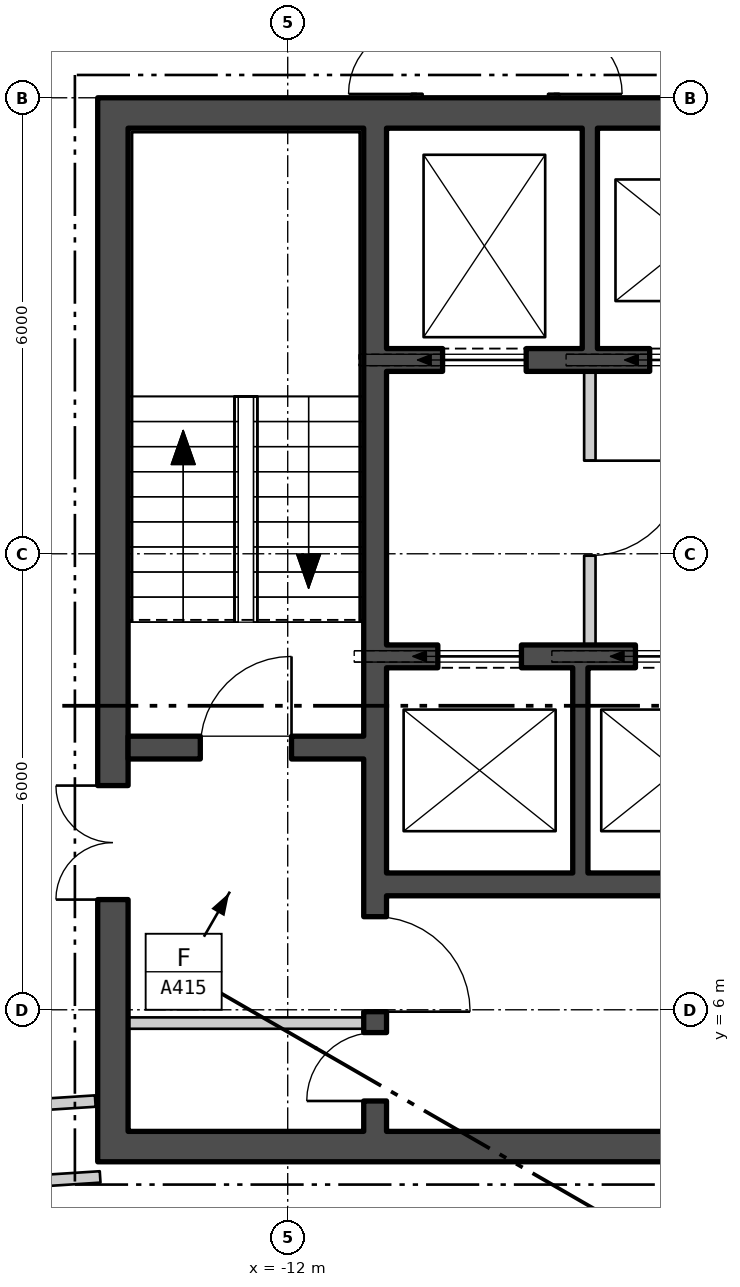
"""IFC4 building model, lengths in metres.
Left out: names, types, materials, properties, quantities, classifications, styles, units other than length and angle.
Written with IfcOpenShell. Run it as: python <this file> out.ifc"""

import sys

from ifc_helpers import new_model, si_unit, direction, frame, frame_2d, origin, place, context, subcontext, project, spatial, polyline, rectangle, outline, extrude, element, fill, save


model = new_model("IFC4")
c1 = context("Model", 3, precision=1e-05, world=origin(), true_north=direction((0.0, 1.0)))
c2 = subcontext(c1, "Body", "Model", "MODEL_VIEW")
j1 = project(units=[si_unit("LENGTHUNIT", "METRE"), si_unit("PLANEANGLEUNIT", "RADIAN")], contexts=[c1])
p1 = place(None, origin())
s1 = spatial("IfcSite", under=j1, at=p1, CompositionType="ELEMENT")
p2 = place(p1, origin())
s2 = spatial("IfcBuilding", under=s1, at=p2, CompositionType="ELEMENT")
p3 = place(p2, frame((0.0, 0.0, 292.2)))
s3 = spatial("IfcBuildingStorey", under=s2, at=p3, CompositionType="ELEMENT", Elevation=292.2)
p4 = place(p3, frame((-25.28, 15.792, -0.18), z_axis=(0.0, 0.0, 1.0), x_axis=(0.500000141277, -0.866025322218, 0.0)))
e1 = element("IfcWall", 1, at=p4, inside=s3, PredefinedType="SOLIDWALL", context=c2, shape_type="SweptSolid", body=[
    extrude(outline(polyline([(-0.13, -0.225), (45.86, -0.225), (45.6, 0.225), (0.13, 0.225), (-0.13, -0.225)])), origin(), (0.0, 0.0, 1.0), 5.9),
])
p5 = place(p4, frame((1.424, 0.0, 1.38)))
e2 = element("IfcOpeningElement", 2, at=p5, cuts=e1, PredefinedType="OPENING", context=c2, shape_type="SweptSolid", body=[
    extrude(rectangle(XDim=2.4, YDim=3.6, at=frame_2d((1.2, 1.8))), frame((0.0, 0.235, 0.0), z_axis=(0.0, -1.0, 0.0), x_axis=(1.0, 0.0, 0.0)), (0.0, 0.0, 1.0), 0.47),
])
p6 = place(p4, frame((5.892, 0.0, 1.38)))
e3 = element("IfcOpeningElement", 3, at=p6, cuts=e1, PredefinedType="OPENING", context=c2, shape_type="SweptSolid", body=[
    extrude(rectangle(XDim=2.4, YDim=3.6, at=frame_2d((1.2, 1.8))), frame((0.0, 0.235, 0.0), z_axis=(0.0, -1.0, 0.0), x_axis=(1.0, 0.0, 0.0)), (0.0, 0.0, 1.0), 0.47),
])
p7 = place(p4, frame((10.399, 0.0, 1.38)))
e4 = element("IfcOpeningElement", 4, at=p7, cuts=e1, PredefinedType="OPENING", context=c2, shape_type="SweptSolid", body=[
    extrude(rectangle(XDim=2.4, YDim=3.6, at=frame_2d((1.2, 1.8))), frame((0.0, 0.235, 0.0), z_axis=(0.0, -1.0, 0.0), x_axis=(1.0, 0.0, 0.0)), (0.0, 0.0, 1.0), 0.47),
])
p8 = place(p4, frame((14.905, 0.0, 1.38)))
e5 = element("IfcOpeningElement", 5, at=p8, cuts=e1, PredefinedType="OPENING", context=c2, shape_type="SweptSolid", body=[
    extrude(rectangle(XDim=2.4, YDim=3.6, at=frame_2d((1.2, 1.8))), frame((0.0, 0.235, 0.0), z_axis=(0.0, -1.0, 0.0), x_axis=(1.0, 0.0, 0.0)), (0.0, 0.0, 1.0), 0.47),
])
p9 = place(p4, frame((19.412, 0.0, 1.38)))
e6 = element("IfcOpeningElement", 6, at=p9, cuts=e1, PredefinedType="OPENING", context=c2, shape_type="SweptSolid", body=[
    extrude(rectangle(XDim=2.4, YDim=3.6, at=frame_2d((1.2, 1.8))), frame((0.0, 0.235, 0.0), z_axis=(0.0, -1.0, 0.0), x_axis=(1.0, 0.0, 0.0)), (0.0, 0.0, 1.0), 0.47),
])
p10 = place(p4, frame((23.918, 0.0, 1.38)))
e7 = element("IfcOpeningElement", 7, at=p10, cuts=e1, PredefinedType="OPENING", context=c2, shape_type="SweptSolid", body=[
    extrude(rectangle(XDim=2.4, YDim=3.6, at=frame_2d((1.2, 1.8))), frame((0.0, 0.235, 0.0), z_axis=(0.0, -1.0, 0.0), x_axis=(1.0, 0.0, 0.0)), (0.0, 0.0, 1.0), 0.47),
])
p11 = place(p4, frame((28.425, 0.0, 1.38)))
e8 = element("IfcOpeningElement", 8, at=p11, cuts=e1, PredefinedType="OPENING", context=c2, shape_type="SweptSolid", body=[
    extrude(rectangle(XDim=2.4, YDim=3.6, at=frame_2d((1.2, 1.8))), frame((0.0, 0.235, 0.0), z_axis=(0.0, -1.0, 0.0), x_axis=(1.0, 0.0, 0.0)), (0.0, 0.0, 1.0), 0.47),
])
p12 = place(p4, frame((32.932, 0.0, 1.38)))
e9 = element("IfcOpeningElement", 9, at=p12, cuts=e1, PredefinedType="OPENING", context=c2, shape_type="SweptSolid", body=[
    extrude(rectangle(XDim=2.4, YDim=3.6, at=frame_2d((1.2, 1.8))), frame((0.0, 0.235, 0.0), z_axis=(0.0, -1.0, 0.0), x_axis=(1.0, 0.0, 0.0)), (0.0, 0.0, 1.0), 0.47),
])
p13 = place(p4, frame((37.438, 0.0, 1.38)))
e10 = element("IfcOpeningElement", 10, at=p13, cuts=e1, PredefinedType="OPENING", context=c2, shape_type="SweptSolid", body=[
    extrude(rectangle(XDim=2.4, YDim=3.6, at=frame_2d((1.2, 1.8))), frame((0.0, 0.235, 0.0), z_axis=(0.0, -1.0, 0.0), x_axis=(1.0, 0.0, 0.0)), (0.0, 0.0, 1.0), 0.47),
])
p14 = place(p4, frame((41.907, 0.0, 1.38)))
e11 = element("IfcOpeningElement", 11, at=p14, cuts=e1, PredefinedType="OPENING", context=c2, shape_type="SweptSolid", body=[
    extrude(rectangle(XDim=2.4, YDim=3.6, at=frame_2d((1.2, 1.8))), frame((0.0, 0.235, 0.0), z_axis=(0.0, -1.0, 0.0), x_axis=(1.0, 0.0, 0.0)), (0.0, 0.0, 1.0), 0.47),
])
p15 = place(p3, frame((-14.5, 4.2, 0.0), z_axis=(0.0, 0.0, 1.0), x_axis=(1.0, 0.0, 0.0)))
e12 = element("IfcWall", 12, at=p15, inside=s3, PredefinedType="SHEAR", context=c2, shape_type="SweptSolid", body=[
    extrude(rectangle(XDim=29.0, YDim=0.4, at=frame_2d((14.5, 0.0))), origin(), (0.0, 0.0, 1.0), 5.7),
])
p16 = place(p15, frame((9.0, 0.0, 0.0)))
e13 = element("IfcOpeningElement", 13, at=p16, cuts=e12, PredefinedType="OPENING", context=c2, shape_type="SweptSolid", body=[
    extrude(rectangle(XDim=1.8, YDim=2.4, at=frame_2d((0.9, 1.2))), frame((0.0, 0.21, 0.0), z_axis=(0.0, -1.0, 0.0), x_axis=(1.0, 0.0, 0.0)), (0.0, 0.0, 1.0), 0.42),
])
p17 = place(p15, frame((19.0, 0.0, 0.0)))
e14 = element("IfcOpeningElement", 14, at=p17, cuts=e12, PredefinedType="OPENING", context=c2, shape_type="SweptSolid", body=[
    extrude(rectangle(XDim=1.8, YDim=2.4, at=frame_2d((0.9, 1.2))), frame((0.0, 0.21, 0.0), z_axis=(0.0, -1.0, 0.0), x_axis=(1.0, 0.0, 0.0)), (0.0, 0.0, 1.0), 0.42),
])
p18 = place(p3, frame((-14.5, 17.8, 0.0), z_axis=(0.0, 0.0, 1.0), x_axis=(1.0, 0.0, 0.0)))
e15 = element("IfcWall", 15, at=p18, inside=s3, PredefinedType="SHEAR", context=c2, shape_type="SweptSolid", body=[
    extrude(rectangle(XDim=29.0, YDim=0.4, at=frame_2d((14.5, 0.0))), origin(), (0.0, 0.0, 1.0), 5.7),
])
p19 = place(p3, frame((-14.3, 4.4, 0.0), z_axis=(0.0, 0.0, 1.0), x_axis=(0.0, 1.0, 0.0)))
e16 = element("IfcWall", 16, at=p19, inside=s3, PredefinedType="SHEAR", context=c2, shape_type="SweptSolid", body=[
    extrude(rectangle(XDim=13.2, YDim=0.4, at=frame_2d((6.6, 0.0))), origin(), (0.0, 0.0, 1.0), 5.7),
])
p20 = place(p19, frame((3.05, 0.0, 0.0)))
e17 = element("IfcOpeningElement", 17, at=p20, cuts=e16, PredefinedType="OPENING", context=c2, shape_type="SweptSolid", body=[
    extrude(rectangle(XDim=1.5, YDim=2.1, at=frame_2d((0.75, 1.05))), frame((0.0, 0.21, 0.0), z_axis=(0.0, -1.0, 0.0), x_axis=(1.0, 0.0, 0.0)), (0.0, 0.0, 1.0), 0.42),
])
p21 = place(p3, frame((-10.85, 4.4, 0.0), z_axis=(0.0, 0.0, 1.0), x_axis=(0.0, 1.0, 0.0)))
e18 = element("IfcWall", 18, at=p21, inside=s3, PredefinedType="SHEAR", context=c2, shape_type="SweptSolid", body=[
    extrude(rectangle(XDim=13.2, YDim=0.3, at=frame_2d((6.6, 0.0))), origin(), (0.0, 0.0, 1.0), 5.7),
])
p22 = place(p21, frame((1.575, 0.0, 0.0)))
e19 = element("IfcOpeningElement", 19, at=p22, cuts=e18, PredefinedType="OPENING", context=c2, shape_type="SweptSolid", body=[
    extrude(rectangle(XDim=1.25, YDim=2.1, at=frame_2d((0.625, 1.05))), frame((0.0, 0.16, 0.0), z_axis=(0.0, -1.0, 0.0), x_axis=(1.0, 0.0, 0.0)), (0.0, 0.0, 1.0), 0.32),
])
p23 = place(p21, frame((0.4, 0.0, 0.0)))
e20 = element("IfcOpeningElement", 20, at=p23, cuts=e18, PredefinedType="OPENING", context=c2, shape_type="SweptSolid", body=[
    extrude(rectangle(XDim=0.9, YDim=2.1, at=frame_2d((0.45, 1.05))), frame((0.0, 0.16, 0.0), z_axis=(0.0, -1.0, 0.0), x_axis=(1.0, 0.0, 0.0)), (0.0, 0.0, 1.0), 0.32),
])
p24 = place(p3, frame((-14.1, 9.45, 0.0), z_axis=(0.0, 0.0, 1.0), x_axis=(1.0, 0.0, 0.0)))
e21 = element("IfcWall", 21, at=p24, inside=s3, PredefinedType="SHEAR", context=c2, shape_type="SweptSolid", body=[
    extrude(rectangle(XDim=3.1, YDim=0.3, at=frame_2d((1.55, 0.0))), origin(), (0.0, 0.0, 1.0), 5.7),
])
p25 = place(p24, frame((0.95, 0.0, 0.0)))
e22 = element("IfcOpeningElement", 22, at=p25, cuts=e21, PredefinedType="OPENING", context=c2, shape_type="SweptSolid", body=[
    extrude(rectangle(XDim=1.2, YDim=2.1, at=frame_2d((0.6, 1.05))), frame((0.0, 0.16, 0.0), z_axis=(0.0, -1.0, 0.0), x_axis=(1.0, 0.0, 0.0)), (0.0, 0.0, 1.0), 0.32),
])
p26 = place(p3, frame((-10.7, 14.55, 0.0), z_axis=(0.0, 0.0, 1.0), x_axis=(1.0, 0.0, 0.0)))
e23 = element("IfcWall", 23, at=p26, inside=s3, PredefinedType="SHEAR", context=c2, shape_type="SweptSolid", body=[
    extrude(rectangle(XDim=21.4, YDim=0.3, at=frame_2d((10.7, 0.0))), origin(), (0.0, 0.0, 1.0), 5.7),
])
p27 = place(p26, frame((0.738, 0.0, 0.0)))
e24 = element("IfcOpeningElement", 24, at=p27, cuts=e23, PredefinedType="OPENING", context=c2, shape_type="SweptSolid", body=[
    extrude(rectangle(XDim=1.1, YDim=2.1, at=frame_2d((0.55, 1.05))), frame((0.0, 0.16, 0.0), z_axis=(0.0, -1.0, 0.0), x_axis=(1.0, 0.0, 0.0)), (0.0, 0.0, 1.0), 0.32),
])
p28 = place(p26, frame((3.462, 0.0, 0.0)))
e25 = element("IfcOpeningElement", 25, at=p28, cuts=e23, PredefinedType="OPENING", context=c2, shape_type="SweptSolid", body=[
    extrude(rectangle(XDim=1.1, YDim=2.1, at=frame_2d((0.55, 1.05))), frame((0.0, 0.16, 0.0), z_axis=(0.0, -1.0, 0.0), x_axis=(1.0, 0.0, 0.0)), (0.0, 0.0, 1.0), 0.32),
])
p29 = place(p26, frame((6.138, 0.0, 0.0)))
e26 = element("IfcOpeningElement", 26, at=p29, cuts=e23, PredefinedType="OPENING", context=c2, shape_type="SweptSolid", body=[
    extrude(rectangle(XDim=1.1, YDim=2.1, at=frame_2d((0.55, 1.05))), frame((0.0, 0.16, 0.0), z_axis=(0.0, -1.0, 0.0), x_axis=(1.0, 0.0, 0.0)), (0.0, 0.0, 1.0), 0.32),
])
p30 = place(p26, frame((8.812, 0.0, 0.0)))
e27 = element("IfcOpeningElement", 27, at=p30, cuts=e23, PredefinedType="OPENING", context=c2, shape_type="SweptSolid", body=[
    extrude(rectangle(XDim=1.1, YDim=2.1, at=frame_2d((0.55, 1.05))), frame((0.0, 0.16, 0.0), z_axis=(0.0, -1.0, 0.0), x_axis=(1.0, 0.0, 0.0)), (0.0, 0.0, 1.0), 0.32),
])
p31 = place(p26, frame((19.562, 0.0, 0.0)))
e28 = element("IfcOpeningElement", 28, at=p31, cuts=e23, PredefinedType="OPENING", context=c2, shape_type="SweptSolid", body=[
    extrude(rectangle(XDim=1.1, YDim=2.1, at=frame_2d((0.55, 1.05))), frame((0.0, 0.16, 0.0), z_axis=(0.0, -1.0, 0.0), x_axis=(1.0, 0.0, 0.0)), (0.0, 0.0, 1.0), 0.32),
])
p32 = place(p26, frame((11.537, 0.0, 0.0)))
e29 = element("IfcOpeningElement", 29, at=p32, cuts=e23, PredefinedType="OPENING", context=c2, shape_type="SweptSolid", body=[
    extrude(rectangle(XDim=1.0, YDim=2.1, at=frame_2d((0.5, 1.05))), frame((0.0, 0.16, 0.0), z_axis=(0.0, -1.0, 0.0), x_axis=(1.0, 0.0, 0.0)), (0.0, 0.0, 1.0), 0.32),
])
p33 = place(p26, frame((15.55, 0.0, 0.0)))
e30 = element("IfcOpeningElement", 30, at=p33, cuts=e23, PredefinedType="OPENING", context=c2, shape_type="SweptSolid", body=[
    extrude(rectangle(XDim=1.0, YDim=2.1, at=frame_2d((0.5, 1.05))), frame((0.0, 0.16, 0.0), z_axis=(0.0, -1.0, 0.0), x_axis=(1.0, 0.0, 0.0)), (0.0, 0.0, 1.0), 0.32),
])
p34 = place(p3, frame((-10.7, 10.65, 0.0), z_axis=(0.0, 0.0, 1.0), x_axis=(1.0, 0.0, 0.0)))
e31 = element("IfcWall", 31, at=p34, inside=s3, PredefinedType="SHEAR", context=c2, shape_type="SweptSolid", body=[
    extrude(rectangle(XDim=10.3, YDim=0.3, at=frame_2d((5.15, 0.0))), origin(), (0.0, 0.0, 1.0), 5.7),
])
p35 = place(p34, frame((0.675, 0.0, 0.0)))
e32 = element("IfcOpeningElement", 32, at=p35, cuts=e31, PredefinedType="OPENING", context=c2, shape_type="SweptSolid", body=[
    extrude(rectangle(XDim=1.1, YDim=2.1, at=frame_2d((0.55, 1.05))), frame((0.0, 0.16, 0.0), z_axis=(0.0, -1.0, 0.0), x_axis=(1.0, 0.0, 0.0)), (0.0, 0.0, 1.0), 0.32),
])
p36 = place(p34, frame((3.275, 0.0, 0.0)))
e33 = element("IfcOpeningElement", 33, at=p36, cuts=e31, PredefinedType="OPENING", context=c2, shape_type="SweptSolid", body=[
    extrude(rectangle(XDim=1.1, YDim=2.1, at=frame_2d((0.55, 1.05))), frame((0.0, 0.16, 0.0), z_axis=(0.0, -1.0, 0.0), x_axis=(1.0, 0.0, 0.0)), (0.0, 0.0, 1.0), 0.32),
])
p37 = place(p34, frame((5.825, 0.0, 0.0)))
e34 = element("IfcOpeningElement", 34, at=p37, cuts=e31, PredefinedType="OPENING", context=c2, shape_type="SweptSolid", body=[
    extrude(rectangle(XDim=1.1, YDim=2.1, at=frame_2d((0.55, 1.05))), frame((0.0, 0.16, 0.0), z_axis=(0.0, -1.0, 0.0), x_axis=(1.0, 0.0, 0.0)), (0.0, 0.0, 1.0), 0.32),
])
p38 = place(p34, frame((8.425, 0.0, 0.0)))
e35 = element("IfcOpeningElement", 35, at=p38, cuts=e31, PredefinedType="OPENING", context=c2, shape_type="SweptSolid", body=[
    extrude(rectangle(XDim=1.0, YDim=2.1, at=frame_2d((0.5, 1.05))), frame((0.0, 0.16, 0.0), z_axis=(0.0, -1.0, 0.0), x_axis=(1.0, 0.0, 0.0)), (0.0, 0.0, 1.0), 0.32),
])
p39 = place(p3, frame((-10.7, 7.65, 0.0), z_axis=(0.0, 0.0, 1.0), x_axis=(1.0, 0.0, 0.0)))
e36 = element("IfcWall", 36, at=p39, inside=s3, PredefinedType="SHEAR", context=c2, shape_type="SweptSolid", body=[
    extrude(rectangle(XDim=10.3, YDim=0.3, at=frame_2d((5.15, 0.0))), origin(), (0.0, 0.0, 1.0), 5.7),
])
p40 = place(p3, frame((-8.025, 14.7, 0.0), z_axis=(0.0, 0.0, 1.0), x_axis=(0.0, 1.0, 0.0)))
e37 = element("IfcWall", 37, at=p40, inside=s3, PredefinedType="SHEAR", context=c2, shape_type="SweptSolid", body=[
    extrude(rectangle(XDim=2.9, YDim=0.2, at=frame_2d((1.45, 0.0))), origin(), (0.0, 0.0, 1.0), 5.7),
])
p41 = place(p3, frame((-8.15, 7.8, 0.0), z_axis=(0.0, 0.0, 1.0), x_axis=(0.0, 1.0, 0.0)))
e38 = element("IfcWall", 38, at=p41, inside=s3, PredefinedType="SHEAR", context=c2, shape_type="SweptSolid", body=[
    extrude(rectangle(XDim=2.7, YDim=0.2, at=frame_2d((1.35, 0.0))), origin(), (0.0, 0.0, 1.0), 5.7),
])
p42 = place(p3, frame((-8.025, 10.8, 0.0), z_axis=(0.0, 0.0, 1.0), x_axis=(0.0, 1.0, 0.0)))
e39 = element("IfcWall", 39, at=p42, inside=s3, PredefinedType="PARTITIONING", context=c2, shape_type="SweptSolid", body=[
    extrude(rectangle(XDim=3.6, YDim=0.15, at=frame_2d((1.8, 0.0))), origin(), (0.0, 0.0, 1.0), 5.7),
])
p43 = place(p42, frame((1.175, 0.0, 0.0)))
e40 = element("IfcOpeningElement", 40, at=p43, cuts=e39, PredefinedType="OPENING", context=c2, shape_type="SweptSolid", body=[
    extrude(rectangle(XDim=1.25, YDim=2.1, at=frame_2d((0.625, 1.05))), frame((0.0, 0.085, 0.0), z_axis=(0.0, -1.0, 0.0), x_axis=(1.0, 0.0, 0.0)), (0.0, 0.0, 1.0), 0.17),
])
p44 = place(p3, frame((-14.1, 5.825, 0.0), z_axis=(0.0, 0.0, 1.0), x_axis=(1.0, 0.0, 0.0)))
e41 = element("IfcWall", 41, at=p44, inside=s3, PredefinedType="PARTITIONING", context=c2, shape_type="SweptSolid", body=[
    extrude(rectangle(XDim=3.1, YDim=0.15, at=frame_2d((1.55, 0.0))), origin(), (0.0, 0.0, 1.0), 5.7),
])
p45 = place(p3, frame((-16.504, 4.672, 0.0), z_axis=(0.0, 0.0, 1.0), x_axis=(0.997932644153, 0.064268481647, 0.0)))
e42 = element("IfcWall", 42, at=p45, inside=s3, PredefinedType="PARTITIONING", context=c2, shape_type="SweptSolid", body=[
    extrude(rectangle(XDim=1.976, YDim=0.15, at=frame_2d((0.988, 0.0))), origin(), (0.0, 0.0, 1.0), 5.7),
])
p46 = place(p3, frame((-16.2, 3.689, 0.0), z_axis=(0.0, 0.0, 1.0), x_axis=(0.997915745008, 0.064530348407, 0.0)))
e43 = element("IfcWall", 43, at=p46, inside=s3, PredefinedType="PARTITIONING", context=c2, shape_type="SweptSolid", body=[
    extrude(rectangle(XDim=1.736, YDim=0.15, at=frame_2d((0.868, 0.0))), origin(), (0.0, 0.0, 1.0), 5.7),
])
p47 = place(p3, frame((-10.3, 18.0, 0.0), z_axis=(0.0, 0.0, 1.0), x_axis=(0.0, 1.0, 0.0)))
e44 = element("IfcWall", 44, at=p47, inside=s3, PredefinedType="PARTITIONING", context=c2, shape_type="SweptSolid", body=[
    extrude(rectangle(XDim=1.75, YDim=0.15, at=frame_2d((0.875, 0.0))), origin(), (0.0, 0.0, 1.0), 5.7),
])
p48 = place(p47, frame((0.05, 0.0, 0.0)))
e45 = element("IfcOpeningElement", 45, at=p48, cuts=e44, PredefinedType="OPENING", context=c2, shape_type="SweptSolid", body=[
    extrude(rectangle(XDim=0.9, YDim=2.1, at=frame_2d((0.45, 1.05))), frame((0.0, 0.085, 0.0), z_axis=(0.0, -1.0, 0.0), x_axis=(1.0, 0.0, 0.0)), (0.0, 0.0, 1.0), 0.17),
])
p49 = place(p3, frame((-8.5, 18.0, 0.0), z_axis=(0.0, 0.0, 1.0), x_axis=(0.0, 1.0, 0.0)))
e46 = element("IfcWall", 46, at=p49, inside=s3, PredefinedType="PARTITIONING", context=c2, shape_type="SweptSolid", body=[
    extrude(rectangle(XDim=1.75, YDim=0.15, at=frame_2d((0.875, 0.0))), origin(), (0.0, 0.0, 1.0), 5.7),
])
p50 = place(p49, frame((0.05, 0.0, 0.0)))
e47 = element("IfcOpeningElement", 47, at=p50, cuts=e46, PredefinedType="OPENING", context=c2, shape_type="SweptSolid", body=[
    extrude(rectangle(XDim=0.9, YDim=2.1, at=frame_2d((0.45, 1.05))), frame((0.0, 0.085, 0.0), z_axis=(0.0, -1.0, 0.0), x_axis=(1.0, 0.0, 0.0)), (0.0, 0.0, 1.0), 0.17),
])
p51 = place(p27, origin())
e48 = element("IfcDoor", 48, at=p51, inside=s3, OperationType="SLIDING_TO_LEFT", PredefinedType="DOOR", context=c2, shape_type="SweptSolid", body=[
    extrude(rectangle(XDim=1.1, YDim=2.1, at=frame_2d((0.55, 1.05))), frame((0.0, 0.025, 0.0), z_axis=(0.0, -1.0, 0.0), x_axis=(1.0, 0.0, 0.0)), (0.0, 0.0, 1.0), 0.05),
])
fill(e24, e48)
p52 = place(p28, origin())
e49 = element("IfcDoor", 49, at=p52, inside=s3, OperationType="SLIDING_TO_LEFT", PredefinedType="DOOR", context=c2, shape_type="SweptSolid", body=[
    extrude(rectangle(XDim=1.1, YDim=2.1, at=frame_2d((0.55, 1.05))), frame((0.0, 0.025, 0.0), z_axis=(0.0, -1.0, 0.0), x_axis=(1.0, 0.0, 0.0)), (0.0, 0.0, 1.0), 0.05),
])
fill(e25, e49)
p53 = place(p35, origin())
e50 = element("IfcDoor", 50, at=p53, inside=s3, OperationType="SLIDING_TO_LEFT", PredefinedType="DOOR", context=c2, shape_type="SweptSolid", body=[
    extrude(rectangle(XDim=1.1, YDim=2.1, at=frame_2d((0.55, 1.05))), frame((0.0, 0.025, 0.0), z_axis=(0.0, -1.0, 0.0), x_axis=(1.0, 0.0, 0.0)), (0.0, 0.0, 1.0), 0.05),
])
fill(e32, e50)
p54 = place(p36, origin())
e51 = element("IfcDoor", 51, at=p54, inside=s3, OperationType="SLIDING_TO_LEFT", PredefinedType="DOOR", context=c2, shape_type="SweptSolid", body=[
    extrude(rectangle(XDim=1.1, YDim=2.1, at=frame_2d((0.55, 1.05))), frame((0.0, 0.025, 0.0), z_axis=(0.0, -1.0, 0.0), x_axis=(1.0, 0.0, 0.0)), (0.0, 0.0, 1.0), 0.05),
])
fill(e33, e51)
p55 = place(p43, origin())
e52 = element("IfcDoor", 52, at=p55, inside=s3, OperationType="SINGLE_SWING_RIGHT", PredefinedType="DOOR", context=c2, shape_type="SweptSolid", body=[
    extrude(rectangle(XDim=1.25, YDim=2.1, at=frame_2d((0.625, 1.05))), frame((0.0, 0.025, 0.0), z_axis=(0.0, -1.0, 0.0), x_axis=(1.0, 0.0, 0.0)), (0.0, 0.0, 1.0), 0.05),
])
fill(e40, e52)
p56 = place(p25, origin())
e53 = element("IfcDoor", 53, at=p56, inside=s3, OperationType="SINGLE_SWING_LEFT", PredefinedType="DOOR", context=c2, shape_type="SweptSolid", body=[
    extrude(rectangle(XDim=1.2, YDim=2.1, at=frame_2d((0.6, 1.05))), frame((0.0, 0.025, 0.0), z_axis=(0.0, -1.0, 0.0), x_axis=(1.0, 0.0, 0.0)), (0.0, 0.0, 1.0), 0.05),
])
fill(e22, e53)
p57 = place(p22, origin())
e54 = element("IfcDoor", 54, at=p57, inside=s3, OperationType="SINGLE_SWING_LEFT", PredefinedType="DOOR", context=c2, shape_type="SweptSolid", body=[
    extrude(rectangle(XDim=1.25, YDim=2.1, at=frame_2d((0.625, 1.05))), frame((0.0, 0.025, 0.0), z_axis=(0.0, -1.0, 0.0), x_axis=(1.0, 0.0, 0.0)), (0.0, 0.0, 1.0), 0.05),
])
fill(e19, e54)
p58 = place(p20, origin())
e55 = element("IfcDoor", 55, at=p58, inside=s3, OperationType="DOUBLE_DOOR_SINGLE_SWING", PredefinedType="DOOR", context=c2, shape_type="SweptSolid", body=[
    extrude(rectangle(XDim=1.5, YDim=2.1, at=frame_2d((0.75, 1.05))), frame((0.0, 0.025, 0.0), z_axis=(0.0, -1.0, 0.0), x_axis=(1.0, 0.0, 0.0)), (0.0, 0.0, 1.0), 0.05),
])
fill(e17, e55)
p59 = place(p23, origin())
e56 = element("IfcDoor", 56, at=p59, inside=s3, OperationType="SINGLE_SWING_RIGHT", PredefinedType="DOOR", context=c2, shape_type="SweptSolid", body=[
    extrude(rectangle(XDim=0.9, YDim=2.1, at=frame_2d((0.45, 1.05))), frame((0.0, 0.025, 0.0), z_axis=(0.0, -1.0, 0.0), x_axis=(1.0, 0.0, 0.0)), (0.0, 0.0, 1.0), 0.05),
])
fill(e20, e56)
p60 = place(p48, origin())
e57 = element("IfcDoor", 57, at=p60, inside=s3, OperationType="SINGLE_SWING_RIGHT", PredefinedType="DOOR", context=c2, shape_type="SweptSolid", body=[
    extrude(rectangle(XDim=0.9, YDim=2.1, at=frame_2d((0.45, 1.05))), frame((0.0, 0.025, 0.0), z_axis=(0.0, -1.0, 0.0), x_axis=(1.0, 0.0, 0.0)), (0.0, 0.0, 1.0), 0.05),
])
fill(e45, e57)
p61 = place(p50, origin())
e58 = element("IfcDoor", 58, at=p61, inside=s3, OperationType="SINGLE_SWING_LEFT", PredefinedType="DOOR", context=c2, shape_type="SweptSolid", body=[
    extrude(rectangle(XDim=0.9, YDim=2.1, at=frame_2d((0.45, 1.05))), frame((0.0, 0.025, 0.0), z_axis=(0.0, -1.0, 0.0), x_axis=(1.0, 0.0, 0.0)), (0.0, 0.0, 1.0), 0.05),
])
fill(e47, e58)
save(model, sys.argv[1])
